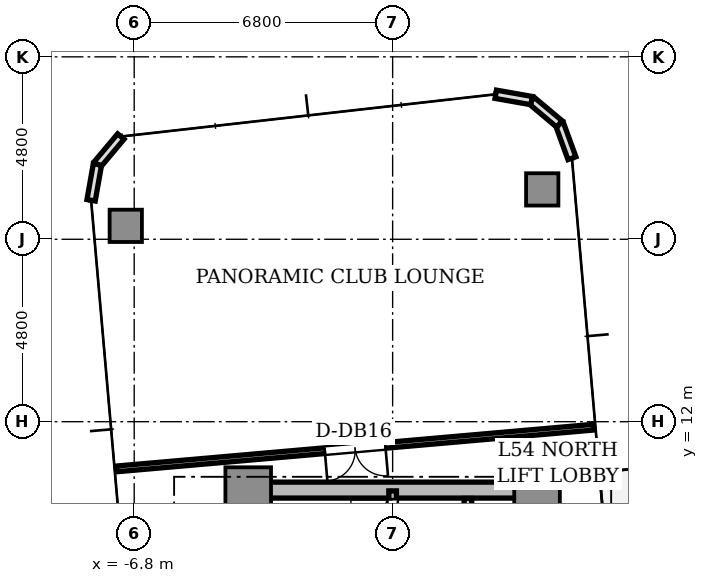
"""IFC4 building model, lengths in metres.
Left out: names, types, materials, properties, quantities, classifications, styles, units other than length and angle.
Written with IfcOpenShell. Run it as: python <this file> out.ifc"""

import sys

from ifc_helpers import new_model, si_unit, direction, frame, frame_2d, origin, origin_2d, place, context, subcontext, project, spatial, rectangle, extrude, source, transform, mapped, element, fill, save


model = new_model("IFC4")
c1 = context("Model", 3, precision=1e-05, world=origin(), true_north=direction((0.0, 1.0)))
c2 = subcontext(c1, "Body", "Model", "MODEL_VIEW")
j1 = project(units=[si_unit("LENGTHUNIT", "METRE"), si_unit("PLANEANGLEUNIT", "RADIAN")], contexts=[c1])
p1 = place(None, origin())
s1 = spatial("IfcSite", under=j1, at=p1, CompositionType="ELEMENT")
p2 = place(p1, origin())
s2 = spatial("IfcBuilding", under=s1, at=p2, CompositionType="ELEMENT")
p3 = place(p2, frame((0.0, 0.0, 195.3)))
s3 = spatial("IfcBuildingStorey", under=s2, at=p3, CompositionType="ELEMENT", Elevation=195.3)
p4 = place(p3, frame((-3.55, 10.2, 0.0), z_axis=(0.0, 0.0, 1.0), x_axis=(1.0, 0.0, 0.0)))
e1 = element("IfcWall", 1, at=p4, inside=s3, PredefinedType="SHEAR", context=c2, shape_type="SweptSolid", body=[
    extrude(rectangle(XDim=7.1, YDim=0.42, at=frame_2d((3.55, 0.0))), origin(), (0.0, 0.0, 1.0), 3.11),
])
m1 = source(origin(), c2, "Body", "SweptSolid", [
    extrude(rectangle(XDim=1.2, YDim=1.2, at=origin_2d()), origin(), (0.0, 0.0, 1.0), 3.11),
])
for number, where, z_axis, x_axis in (
    (2, (-3.8, 10.2, 0.0), (0.0, 0.0, 1.0), (1.0, 0.0, 0.0)),
    (3, (3.8, 10.2, 0.0), (0.0, 0.0, 1.0), (1.0, 0.0, 0.0)),
):
    element("IfcColumn", number, at=place(p3, frame(where, z_axis=z_axis, x_axis=x_axis)), inside=s3, PredefinedType="COLUMN", context=c2, shape_type="MappedRepresentation", body=[
        mapped(m1, transform((0.0, 0.0, 0.0), scale=1.0)),
    ])
m2 = source(origin(), c2, "Body", "SweptSolid", [
    extrude(rectangle(XDim=0.85, YDim=0.85, at=origin_2d()), origin(), (0.0, 0.0, 1.0), 3.11),
])
for number, where, z_axis, x_axis in (
    (4, (3.936, 18.112, 0.0), (0.0, 0.0, 1.0), (1.0, 0.0, 0.0)),
    (5, (-7.022, 17.153, 0.0), (0.0, 0.0, 1.0), (1.0, 0.0, 0.0)),
):
    element("IfcColumn", number, at=place(p3, frame(where, z_axis=z_axis, x_axis=x_axis)), inside=s3, PredefinedType="COLUMN", context=c2, shape_type="MappedRepresentation", body=[
        mapped(m2, transform((0.0, 0.0, 0.0), scale=1.0)),
    ])
p5 = place(p3, frame((4.718, 18.933, 0.0), z_axis=(0.0, 0.0, 1.0), x_axis=(-0.34188635151, 0.939741306239, 0.0)))
e6 = element("IfcWall", 6, at=p5, inside=s3, PredefinedType="STANDARD", context=c2, shape_type="SweptSolid", body=[
    extrude(rectangle(XDim=0.958, YDim=0.22, at=frame_2d((0.479, 0.0))), origin(), (0.0, 0.0, 1.0), 3.11),
])
for number, where, z_axis, x_axis in (
    (7, (4.39, 19.833, 0.0), (0.0, 0.0, 1.0), (-0.766, 0.643, 0.0)),
    (8, (3.657, 20.449, 0.0), (0.0, 0.0, 1.0), (-0.985, 0.174, 0.0)),
):
    element("IfcWall", number, at=place(p3, frame(where, z_axis=z_axis, x_axis=x_axis)), inside=s3, PredefinedType="STANDARD", context=c2, shape_type="SweptSolid", body=[
        extrude(rectangle(XDim=0.958, YDim=0.22, at=frame_2d((0.479, 0.0))), origin(), (0.0, 0.0, 1.0), 3.11),
    ])
for number, where, z_axis, x_axis in (
    (9, (-7.152, 19.503, 0.0), (0.0, 0.0, 1.0), (-0.643, -0.766, 0.0)),
    (10, (-7.768, 18.769, 0.0), (0.0, 0.0, 1.0), (-0.174, -0.985, 0.0)),
):
    element("IfcWall", number, at=place(p3, frame(where, z_axis=z_axis, x_axis=x_axis)), inside=s3, PredefinedType="STANDARD", context=c2, shape_type="SweptSolid", body=[
        extrude(rectangle(XDim=0.958, YDim=0.22, at=frame_2d((0.479, 0.0))), origin(), (0.0, 0.0, 1.0), 3.11),
    ])
p6 = place(p3, frame((0.0, 2.5, 0.0), z_axis=(0.0, 0.0, 1.0), x_axis=(0.0, 1.0, 0.0)))
e11 = element("IfcWall", 11, at=p6, inside=s3, PredefinedType="SOLIDWALL", context=c2, shape_type="SweptSolid", body=[
    extrude(rectangle(XDim=7.68, YDim=0.2, at=frame_2d((3.84, 0.0))), origin(), (0.0, 0.0, 1.0), 3.11),
])
p7 = place(p6, frame((6.36, 0.0, 0.0)))
e12 = element("IfcOpeningElement", 12, at=p7, cuts=e11, PredefinedType="OPENING", context=c2, shape_type="SweptSolid", body=[
    extrude(rectangle(XDim=1.1, YDim=2.15, at=frame_2d((0.55, 1.075))), frame((0.0, 0.11, 0.0), z_axis=(0.0, -1.0, 0.0), x_axis=(1.0, 0.0, 0.0)), (0.0, 0.0, 1.0), 0.22),
])
p8 = place(p3, frame((1.98, 5.32, 0.0), z_axis=(0.0, 0.0, 1.0), x_axis=(0.0, 1.0, 0.0)))
e13 = element("IfcWall", 13, at=p8, inside=s3, PredefinedType="SOLIDWALL", context=c2, shape_type="SweptSolid", body=[
    extrude(rectangle(XDim=4.66, YDim=0.2, at=frame_2d((2.33, 0.0))), origin(), (0.0, 0.0, 1.0), 2.66),
])
p9 = place(p8, frame((3.04, 0.0, 0.0)))
e14 = element("IfcOpeningElement", 14, at=p9, cuts=e13, PredefinedType="OPENING", context=c2, shape_type="SweptSolid", body=[
    extrude(rectangle(XDim=0.85, YDim=2.1, at=frame_2d((0.425, 1.05))), frame((0.0, 0.11, 0.0), z_axis=(0.0, -1.0, 0.0), x_axis=(1.0, 0.0, 0.0)), (0.0, 0.0, 1.0), 0.22),
])
p10 = place(p3, frame((5.287, 11.856, 0.0), z_axis=(0.0, 0.0, 1.0), x_axis=(-0.996194790044, -0.087154691724, 0.0)))
e15 = element("IfcWall", 15, at=p10, inside=s3, PredefinedType="PARTITIONING", context=c2, shape_type="SweptSolid", body=[
    extrude(rectangle(XDim=12.6, YDim=0.15, at=frame_2d((6.3, 0.0))), origin(), (0.0, 0.0, 1.0), 2.66),
])
p11 = place(p10, frame((5.5, 0.0, 0.0)))
e16 = element("IfcOpeningElement", 16, at=p11, cuts=e15, PredefinedType="OPENING", context=c2, shape_type="SweptSolid", body=[
    extrude(rectangle(XDim=1.6, YDim=2.25, at=frame_2d((0.8, 1.125))), frame((0.0, 0.085, 0.0), z_axis=(0.0, -1.0, 0.0), x_axis=(1.0, 0.0, 0.0)), (0.0, 0.0, 1.0), 0.17),
])
m3 = source(origin(), c2, "Body", "SweptSolid", [
    extrude(rectangle(XDim=1.1, YDim=0.05, at=origin_2d()), origin(), (0.0, 0.0, 1.0), 2.15),
])
p12 = place(p7, frame((0.55, 0.0, 0.0)))
e17 = element("IfcDoor", 17, at=p12, inside=s3, OperationType="SINGLE_SWING_RIGHT", PredefinedType="DOOR", context=c2, shape_type="MappedRepresentation", body=[
    mapped(m3, transform((0.0, 0.0, 0.0), scale=1.0)),
])
fill(e12, e17)
m4 = source(origin(), c2, "Body", "SweptSolid", [
    extrude(rectangle(XDim=1.6, YDim=0.05, at=origin_2d()), origin(), (0.0, 0.0, 1.0), 2.25),
])
p13 = place(p11, frame((0.8, 0.0, 0.0)))
e18 = element("IfcDoor", 18, at=p13, inside=s3, OperationType="DOUBLE_DOOR_SINGLE_SWING", PredefinedType="DOOR", context=c2, shape_type="MappedRepresentation", body=[
    mapped(m4, transform((0.0, 0.0, 0.0), scale=1.0)),
])
fill(e16, e18)
save(model, sys.argv[1])
